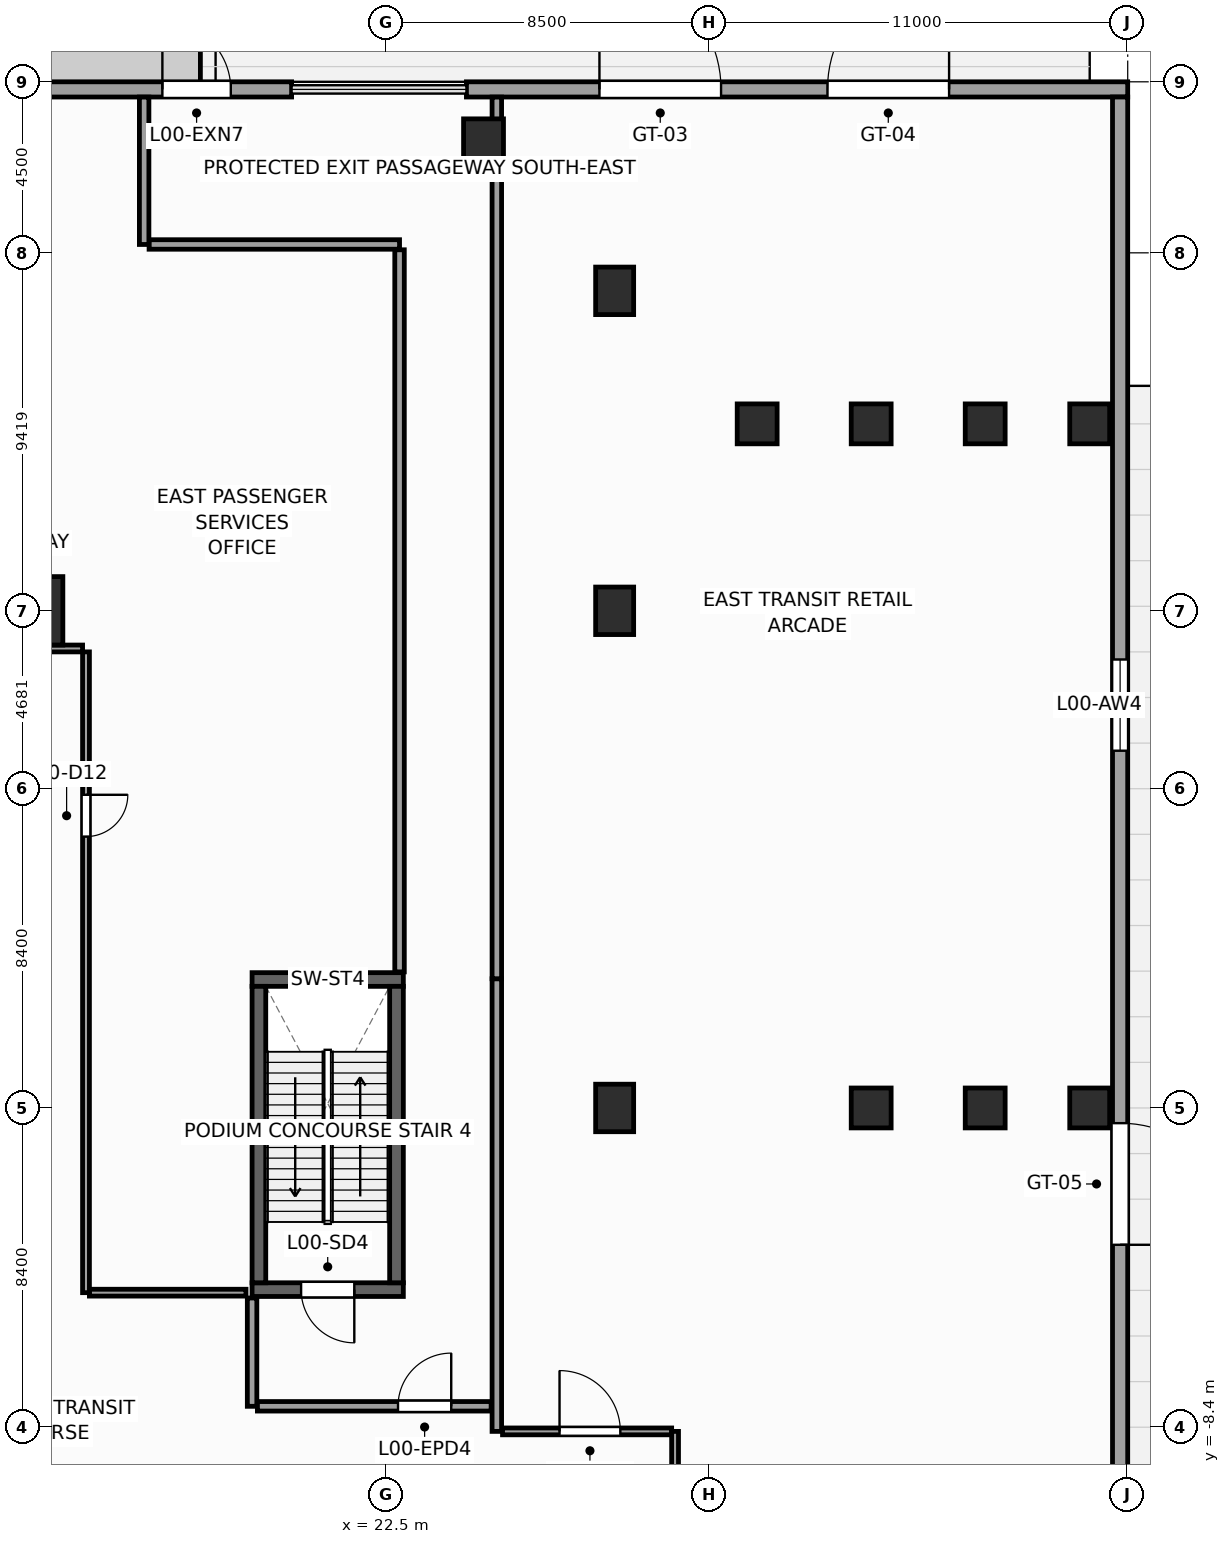
"""IFC4 building model, lengths in metres.
Left out: names, types, materials, properties, quantities, classifications, styles, units other than length and angle.
Written with IfcOpenShell. Run it as: python <this file> out.ifc"""

import sys

from ifc_helpers import new_model, si_unit, direction, frame, frame_2d, origin, origin_2d, place, context, subcontext, project, spatial, rectangle, extrude, source, transform, mapped, element, fill, save


model = new_model("IFC4")
c1 = context("Model", 3, precision=1e-05, world=origin(), true_north=direction((0.0, 1.0)))
c2 = subcontext(c1, "Body", "Model", "MODEL_VIEW")
j1 = project(units=[si_unit("LENGTHUNIT", "METRE"), si_unit("PLANEANGLEUNIT", "RADIAN")], contexts=[c1])
p1 = place(None, origin())
s1 = spatial("IfcSite", under=j1, at=p1, CompositionType="ELEMENT")
p2 = place(p1, origin())
s2 = spatial("IfcBuilding", under=s1, at=p2, CompositionType="ELEMENT")
p3 = place(p2, origin())
s3 = spatial("IfcBuildingStorey", under=s2, at=p3, CompositionType="ELEMENT", Elevation=0.0)
p4 = place(p3, frame((18.96, -4.78, 0.0), z_axis=(0.0, 0.0, 1.0), x_axis=(1.0, 0.0, 0.0)))
e1 = element("IfcWall", 1, at=p4, inside=s3, PredefinedType="SHEAR", context=c2, shape_type="SweptSolid", body=[
    extrude(rectangle(XDim=3.98, YDim=0.36, at=frame_2d((1.99, 0.0))), origin(), (0.0, 0.0, 1.0), 6.0),
])
p5 = place(p4, frame((1.29, 0.0, 0.0)))
e2 = element("IfcOpeningElement", 2, at=p5, cuts=e1, PredefinedType="OPENING", context=c2, shape_type="SweptSolid", body=[
    extrude(rectangle(XDim=1.4, YDim=2.2, at=frame_2d((0.7, 1.1))), frame((0.0, 0.19, 0.0), z_axis=(0.0, -1.0, 0.0), x_axis=(1.0, 0.0, 0.0)), (0.0, 0.0, 1.0), 0.38),
])
p6 = place(p3, frame((18.96, 3.38, 0.0), z_axis=(0.0, 0.0, 1.0), x_axis=(1.0, 0.0, 0.0)))
e3 = element("IfcWall", 3, at=p6, inside=s3, PredefinedType="SHEAR", context=c2, shape_type="SweptSolid", body=[
    extrude(rectangle(XDim=3.98, YDim=0.36, at=frame_2d((1.99, 0.0))), origin(), (0.0, 0.0, 1.0), 6.0),
])
for number, where, z_axis, x_axis in (
    (4, (19.14, -4.6, 0.0), (0.0, 0.0, 1.0), (0.0, 1.0, 0.0)),
    (5, (22.76, -4.6, 0.0), (0.0, 0.0, 1.0), (0.0, 1.0, 0.0)),
):
    element("IfcWall", number, at=place(p3, frame(where, z_axis=z_axis, x_axis=x_axis)), inside=s3, PredefinedType="SHEAR", context=c2, shape_type="SweptSolid", body=[
        extrude(rectangle(XDim=7.8, YDim=0.36, at=frame_2d((3.9, 0.0))), origin(), (0.0, 0.0, 1.0), 6.0),
    ])
m1 = source(origin(), c2, "Body", "SweptSolid", [
    extrude(rectangle(XDim=1.8, YDim=1.8, at=origin_2d()), origin(), (0.0, 0.0, 1.0), 6.0),
])
p7 = place(p3, frame((13.081, 13.081, 0.0), z_axis=(0.0, 0.0, 1.0), x_axis=(1.0, 0.0, 0.0)))
e6 = element("IfcColumn", 6, at=p7, inside=s3, PredefinedType="COLUMN", context=c2, shape_type="MappedRepresentation", body=[
    mapped(m1, transform((0.0, 0.0, 0.0), scale=1.0)),
])
m2 = source(origin(), c2, "Body", "SweptSolid", [
    extrude(rectangle(XDim=1.0, YDim=1.25, at=origin_2d()), origin(), (0.0, 0.0, 1.0), 6.0),
])
for number, where, z_axis, x_axis in (
    (7, (28.5, 21.5, 0.0), (0.0, 0.0, 1.0), (1.0, 0.0, 0.0)),
    (8, (28.5, 0.0, 0.0), (0.0, 0.0, 1.0), (1.0, 0.0, 0.0)),
    (9, (28.5, 13.081, 0.0), (0.0, 0.0, 1.0), (1.0, 0.0, 0.0)),
):
    element("IfcColumn", number, at=place(p3, frame(where, z_axis=z_axis, x_axis=x_axis)), inside=s3, PredefinedType="COLUMN", context=c2, shape_type="MappedRepresentation", body=[
        mapped(m2, transform((0.0, 0.0, 0.0), scale=1.0)),
    ])
m3 = source(origin(), c2, "Body", "SweptSolid", [
    extrude(rectangle(XDim=1.05, YDim=1.05, at=origin_2d()), origin(), (0.0, 0.0, 1.0), 6.0),
])
for number, where, z_axis, x_axis in (
    (10, (25.05, 25.5, 0.0), (0.0, 0.0, 1.0), (1.0, 0.0, 0.0)),
    (11, (32.25, 18.0, 0.0), (0.0, 0.0, 1.0), (1.0, 0.0, 0.0)),
    (12, (35.25, 0.0, 0.0), (0.0, 0.0, 1.0), (1.0, 0.0, 0.0)),
    (13, (35.25, 18.0, 0.0), (0.0, 0.0, 1.0), (1.0, 0.0, 0.0)),
    (14, (38.25, 0.0, 0.0), (0.0, 0.0, 1.0), (1.0, 0.0, 0.0)),
    (15, (38.25, 18.0, 0.0), (0.0, 0.0, 1.0), (1.0, 0.0, 0.0)),
    (16, (41.0, 0.0, 0.0), (0.0, 0.0, 1.0), (1.0, 0.0, 0.0)),
    (17, (41.0, 18.0, 0.0), (0.0, 0.0, 1.0), (1.0, 0.0, 0.0)),
):
    element("IfcColumn", number, at=place(p3, frame(where, z_axis=z_axis, x_axis=x_axis)), inside=s3, PredefinedType="COLUMN", context=c2, shape_type="MappedRepresentation", body=[
        mapped(m3, transform((0.0, 0.0, 0.0), scale=1.0)),
    ])
p8 = place(p3, frame((-30.0, 26.8, 0.0), z_axis=(0.0, 0.0, 1.0), x_axis=(1.0, 0.0, 0.0)))
e18 = element("IfcWall", 18, at=p8, inside=s3, PredefinedType="STANDARD", context=c2, shape_type="SweptSolid", body=[
    extrude(rectangle(XDim=50.0, YDim=0.4, at=frame_2d((25.0, 0.0))), origin(), (0.0, 0.0, 1.0), 5.66),
])
p9 = place(p8, frame((9.6, 0.0, 0.0)))
e19 = element("IfcOpeningElement", 19, at=p9, cuts=e18, PredefinedType="OPENING", context=c2, shape_type="SweptSolid", body=[
    extrude(rectangle(XDim=1.8, YDim=2.4, at=frame_2d((0.9, 1.2))), frame((0.0, 0.21, 0.0), z_axis=(0.0, -1.0, 0.0), x_axis=(1.0, 0.0, 0.0)), (0.0, 0.0, 1.0), 0.42),
])
p10 = place(p8, frame((14.3, 0.0, 0.0)))
e20 = element("IfcOpeningElement", 20, at=p10, cuts=e18, PredefinedType="OPENING", context=c2, shape_type="SweptSolid", body=[
    extrude(rectangle(XDim=1.8, YDim=2.4, at=frame_2d((0.9, 1.2))), frame((0.0, 0.21, 0.0), z_axis=(0.0, -1.0, 0.0), x_axis=(1.0, 0.0, 0.0)), (0.0, 0.0, 1.0), 0.42),
])
p11 = place(p8, frame((18.925, 0.0, 0.0)))
e21 = element("IfcOpeningElement", 21, at=p11, cuts=e18, PredefinedType="OPENING", context=c2, shape_type="SweptSolid", body=[
    extrude(rectangle(XDim=1.8, YDim=2.4, at=frame_2d((0.9, 1.2))), frame((0.0, 0.21, 0.0), z_axis=(0.0, -1.0, 0.0), x_axis=(1.0, 0.0, 0.0)), (0.0, 0.0, 1.0), 0.42),
])
p12 = place(p8, frame((23.9, 0.0, 0.0)))
e22 = element("IfcOpeningElement", 22, at=p12, cuts=e18, PredefinedType="OPENING", context=c2, shape_type="SweptSolid", body=[
    extrude(rectangle(XDim=1.8, YDim=2.4, at=frame_2d((0.9, 1.2))), frame((0.0, 0.21, 0.0), z_axis=(0.0, -1.0, 0.0), x_axis=(1.0, 0.0, 0.0)), (0.0, 0.0, 1.0), 0.42),
])
p13 = place(p8, frame((34.3, 0.0, 0.0)))
e23 = element("IfcOpeningElement", 23, at=p13, cuts=e18, PredefinedType="OPENING", context=c2, shape_type="SweptSolid", body=[
    extrude(rectangle(XDim=1.8, YDim=2.4, at=frame_2d((0.9, 1.2))), frame((0.0, 0.21, 0.0), z_axis=(0.0, -1.0, 0.0), x_axis=(1.0, 0.0, 0.0)), (0.0, 0.0, 1.0), 0.42),
])
p14 = place(p8, frame((39.275, 0.0, 0.0)))
e24 = element("IfcOpeningElement", 24, at=p14, cuts=e18, PredefinedType="OPENING", context=c2, shape_type="SweptSolid", body=[
    extrude(rectangle(XDim=1.8, YDim=2.4, at=frame_2d((0.9, 1.2))), frame((0.0, 0.21, 0.0), z_axis=(0.0, -1.0, 0.0), x_axis=(1.0, 0.0, 0.0)), (0.0, 0.0, 1.0), 0.42),
])
p15 = place(p8, frame((46.6, 0.0, 0.0)))
e25 = element("IfcOpeningElement", 25, at=p15, cuts=e18, PredefinedType="OPENING", context=c2, shape_type="SweptSolid", body=[
    extrude(rectangle(XDim=1.8, YDim=2.4, at=frame_2d((0.9, 1.2))), frame((0.0, 0.21, 0.0), z_axis=(0.0, -1.0, 0.0), x_axis=(1.0, 0.0, 0.0)), (0.0, 0.0, 1.0), 0.42),
])
p16 = place(p3, frame((24.6, 26.8, 0.0), z_axis=(0.0, 0.0, 1.0), x_axis=(1.0, 0.0, 0.0)))
e26 = element("IfcWall", 26, at=p16, inside=s3, PredefinedType="STANDARD", context=c2, shape_type="SweptSolid", body=[
    extrude(rectangle(XDim=17.4, YDim=0.4, at=frame_2d((8.7, 0.0))), origin(), (0.0, 0.0, 1.0), 5.66),
])
p17 = place(p16, frame((3.5, 0.0, 0.0)))
e27 = element("IfcOpeningElement", 27, at=p17, cuts=e26, PredefinedType="OPENING", context=c2, shape_type="SweptSolid", body=[
    extrude(rectangle(XDim=3.2, YDim=3.6, at=frame_2d((1.6, 1.8))), frame((0.0, 0.21, 0.0), z_axis=(0.0, -1.0, 0.0), x_axis=(1.0, 0.0, 0.0)), (0.0, 0.0, 1.0), 0.42),
])
p18 = place(p16, frame((9.5, 0.0, 0.0)))
e28 = element("IfcOpeningElement", 28, at=p18, cuts=e26, PredefinedType="OPENING", context=c2, shape_type="SweptSolid", body=[
    extrude(rectangle(XDim=3.2, YDim=3.6, at=frame_2d((1.6, 1.8))), frame((0.0, 0.21, 0.0), z_axis=(0.0, -1.0, 0.0), x_axis=(1.0, 0.0, 0.0)), (0.0, 0.0, 1.0), 0.42),
])
p19 = place(p3, frame((41.8, -26.6, 0.0), z_axis=(0.0, 0.0, 1.0), x_axis=(0.0, 1.0, 0.0)))
e29 = element("IfcWall", 29, at=p19, inside=s3, PredefinedType="STANDARD", context=c2, shape_type="SweptSolid", body=[
    extrude(rectangle(XDim=53.2, YDim=0.4, at=frame_2d((26.6, 0.0))), origin(), (0.0, 0.0, 1.0), 5.66),
])
p20 = place(p19, frame((10.0, 0.0, 0.9)))
e30 = element("IfcOpeningElement", 30, at=p20, cuts=e29, PredefinedType="OPENING", context=c2, shape_type="SweptSolid", body=[
    extrude(rectangle(XDim=2.4, YDim=3.2, at=frame_2d((1.2, 1.6))), frame((0.0, 0.21, 0.0), z_axis=(0.0, -1.0, 0.0), x_axis=(1.0, 0.0, 0.0)), (0.0, 0.0, 1.0), 0.42),
])
p21 = place(p19, frame((36.0, 0.0, 0.9)))
e31 = element("IfcOpeningElement", 31, at=p21, cuts=e29, PredefinedType="OPENING", context=c2, shape_type="SweptSolid", body=[
    extrude(rectangle(XDim=2.4, YDim=3.2, at=frame_2d((1.2, 1.6))), frame((0.0, 0.21, 0.0), z_axis=(0.0, -1.0, 0.0), x_axis=(1.0, 0.0, 0.0)), (0.0, 0.0, 1.0), 0.42),
])
p22 = place(p19, frame((23.0, 0.0, 0.0)))
e32 = element("IfcOpeningElement", 32, at=p22, cuts=e29, PredefinedType="OPENING", context=c2, shape_type="SweptSolid", body=[
    extrude(rectangle(XDim=3.2, YDim=3.6, at=frame_2d((1.6, 1.8))), frame((0.0, 0.21, 0.0), z_axis=(0.0, -1.0, 0.0), x_axis=(1.0, 0.0, 0.0)), (0.0, 0.0, 1.0), 0.42),
])
p23 = place(p3, frame((25.55, -8.51, 0.0), z_axis=(0.0, 0.0, 1.0), x_axis=(1.0, 0.0, 0.0)))
e33 = element("IfcWall", 33, at=p23, inside=s3, PredefinedType="PARTITIONING", context=c2, shape_type="SweptSolid", body=[
    extrude(rectangle(XDim=4.45, YDim=0.18, at=frame_2d((2.225, 0.0))), origin(), (0.0, 0.0, 1.0), 5.66),
])
p24 = place(p23, frame((1.5, 0.0, 0.0)))
e34 = element("IfcOpeningElement", 34, at=p24, cuts=e33, PredefinedType="OPENING", context=c2, shape_type="SweptSolid", body=[
    extrude(rectangle(XDim=1.6, YDim=2.5, at=frame_2d((0.8, 1.25))), frame((0.0, 0.1, 0.0), z_axis=(0.0, -1.0, 0.0), x_axis=(1.0, 0.0, 0.0)), (0.0, 0.0, 1.0), 0.2),
])
p25 = place(p3, frame((30.09, -11.89, 0.0), z_axis=(0.0, 0.0, 1.0), x_axis=(0.0, 1.0, 0.0)))
e35 = element("IfcWall", 35, at=p25, inside=s3, PredefinedType="PARTITIONING", context=c2, shape_type="SweptSolid", body=[
    extrude(rectangle(XDim=3.38, YDim=0.18, at=frame_2d((1.69, 0.0))), origin(), (0.0, 0.0, 1.0), 5.66),
])
p26 = place(p3, frame((14.68, -4.86, 0.0), z_axis=(0.0, 0.0, 1.0), x_axis=(1.0, 0.0, 0.0)))
e36 = element("IfcWall", 36, at=p26, inside=s3, PredefinedType="PARTITIONING", context=c2, shape_type="SweptSolid", body=[
    extrude(rectangle(XDim=4.12, YDim=0.18, at=frame_2d((2.06, 0.0))), origin(), (0.0, 0.0, 1.0), 5.66),
])
p27 = place(p3, frame((14.59, -4.86, 0.0), z_axis=(0.0, 0.0, 1.0), x_axis=(0.0, 1.0, 0.0)))
e37 = element("IfcWall", 37, at=p27, inside=s3, PredefinedType="PARTITIONING", context=c2, shape_type="SweptSolid", body=[
    extrude(rectangle(XDim=16.86, YDim=0.18, at=frame_2d((8.43, 0.0))), origin(), (0.0, 0.0, 1.0), 5.66),
])
p28 = place(p27, frame((12.0, 0.0, 0.0)))
e38 = element("IfcOpeningElement", 38, at=p28, cuts=e37, PredefinedType="OPENING", context=c2, shape_type="SweptSolid", body=[
    extrude(rectangle(XDim=1.1, YDim=2.2, at=frame_2d((0.55, 1.1))), frame((0.0, 0.1, 0.0), z_axis=(0.0, -1.0, 0.0), x_axis=(1.0, 0.0, 0.0)), (0.0, 0.0, 1.0), 0.2),
])
p29 = place(p3, frame((-14.5, 12.09, 0.0), z_axis=(0.0, 0.0, 1.0), x_axis=(1.0, 0.0, 0.0)))
e39 = element("IfcWall", 39, at=p29, inside=s3, PredefinedType="PARTITIONING", context=c2, shape_type="SweptSolid", body=[
    extrude(rectangle(XDim=29.0, YDim=0.18, at=frame_2d((14.5, 0.0))), origin(), (0.0, 0.0, 1.0), 5.66),
])
p30 = place(p29, frame((13.7, 0.0, 0.0)))
e40 = element("IfcOpeningElement", 40, at=p30, cuts=e39, PredefinedType="OPENING", context=c2, shape_type="SweptSolid", body=[
    extrude(rectangle(XDim=1.6, YDim=2.5, at=frame_2d((0.8, 1.25))), frame((0.0, 0.1, 0.0), z_axis=(0.0, -1.0, 0.0), x_axis=(1.0, 0.0, 0.0)), (0.0, 0.0, 1.0), 0.2),
])
p31 = place(p3, frame((25.4, -8.51, 0.0), z_axis=(0.0, 0.0, 1.0), x_axis=(0.0, 1.0, 0.0)))
e41 = element("IfcWall", 41, at=p31, inside=s3, PredefinedType="PARTITIONING", context=c2, shape_type="SweptSolid", body=[
    extrude(rectangle(XDim=11.91, YDim=0.25, at=frame_2d((5.955, 0.0))), origin(), (0.0, 0.0, 1.0), 5.66),
])
p32 = place(p3, frame((25.4, 3.4, 0.0), z_axis=(0.0, 0.0, 1.0), x_axis=(0.0, 1.0, 0.0)))
e42 = element("IfcWall", 42, at=p32, inside=s3, PredefinedType="PARTITIONING", context=c2, shape_type="SweptSolid", body=[
    extrude(rectangle(XDim=23.198, YDim=0.25, at=frame_2d((11.599, 0.0))), origin(), (0.0, 0.0, 1.0), 5.66),
])
p33 = place(p3, frame((19.1, -7.85, 0.0), z_axis=(0.0, 0.0, 1.0), x_axis=(1.0, 0.0, 0.0)))
e43 = element("IfcWall", 43, at=p33, inside=s3, PredefinedType="PARTITIONING", context=c2, shape_type="SweptSolid", body=[
    extrude(rectangle(XDim=6.15, YDim=0.25, at=frame_2d((3.075, 0.0))), origin(), (0.0, 0.0, 1.0), 5.66),
])
p34 = place(p33, frame((3.7, 0.0, 0.0)))
e44 = element("IfcOpeningElement", 44, at=p34, cuts=e43, PredefinedType="OPENING", context=c2, shape_type="SweptSolid", body=[
    extrude(rectangle(XDim=1.4, YDim=2.2, at=frame_2d((0.7, 1.1))), frame((0.0, 0.135, 0.0), z_axis=(0.0, -1.0, 0.0), x_axis=(1.0, 0.0, 0.0)), (0.0, 0.0, 1.0), 0.27),
])
p35 = place(p3, frame((18.96, -7.85, 0.0), z_axis=(0.0, 0.0, 1.0), x_axis=(0.0, 1.0, 0.0)))
e45 = element("IfcWall", 45, at=p35, inside=s3, PredefinedType="PARTITIONING", context=c2, shape_type="SweptSolid", body=[
    extrude(rectangle(XDim=2.85, YDim=0.25, at=frame_2d((1.425, 0.0))), origin(), (0.0, 0.0, 1.0), 5.66),
])
p36 = place(p3, frame((22.84, 3.58, 0.0), z_axis=(0.0, 0.0, 1.0), x_axis=(0.0, 1.0, 0.0)))
e46 = element("IfcWall", 46, at=p36, inside=s3, PredefinedType="PARTITIONING", context=c2, shape_type="SweptSolid", body=[
    extrude(rectangle(XDim=19.0, YDim=0.25, at=frame_2d((9.5, 0.0))), origin(), (0.0, 0.0, 1.0), 5.66),
])
p37 = place(p3, frame((16.25, 22.72, 0.0), z_axis=(0.0, 0.0, 1.0), x_axis=(1.0, 0.0, 0.0)))
e47 = element("IfcWall", 47, at=p37, inside=s3, PredefinedType="PARTITIONING", context=c2, shape_type="SweptSolid", body=[
    extrude(rectangle(XDim=6.59, YDim=0.25, at=frame_2d((3.295, 0.0))), origin(), (0.0, 0.0, 1.0), 5.66),
])
p38 = place(p3, frame((16.12, 22.72, 0.0), z_axis=(0.0, 0.0, 1.0), x_axis=(0.0, 1.0, 0.0)))
e48 = element("IfcWall", 48, at=p38, inside=s3, PredefinedType="PARTITIONING", context=c2, shape_type="SweptSolid", body=[
    extrude(rectangle(XDim=3.878, YDim=0.25, at=frame_2d((1.939, 0.0))), origin(), (0.0, 0.0, 1.0), 5.66),
])
m4 = source(origin(), c2, "Body", "SweptSolid", [
    extrude(rectangle(XDim=2.4, YDim=3.2, at=frame_2d((1.2, 1.6))), frame((0.0, 0.03, 0.0), z_axis=(0.0, -1.0, 0.0), x_axis=(1.0, 0.0, 0.0)), (0.0, 0.0, 1.0), 0.06),
])
p39 = place(p21, origin())
e49 = element("IfcWindow", 49, at=p39, inside=s3, PartitioningType="SINGLE_PANEL", PredefinedType="WINDOW", context=c2, shape_type="MappedRepresentation", body=[
    mapped(m4, transform((0.0, 0.0, 0.0), scale=1.0)),
])
fill(e31, e49)
m5 = source(origin(), c2, "Body", "SweptSolid", [
    extrude(rectangle(XDim=1.8, YDim=2.4, at=frame_2d((0.9, 1.2))), frame((0.0, 0.025, 0.0), z_axis=(0.0, -1.0, 0.0), x_axis=(1.0, 0.0, 0.0)), (0.0, 0.0, 1.0), 0.05),
])
p40 = place(p15, origin())
e50 = element("IfcDoor", 50, at=p40, inside=s3, OperationType="SINGLE_SWING_LEFT", PredefinedType="DOOR", context=c2, shape_type="MappedRepresentation", body=[
    mapped(m5, transform((0.0, 0.0, 0.0), scale=1.0)),
])
fill(e25, e50)
m6 = source(origin(), c2, "Body", "SweptSolid", [
    extrude(rectangle(XDim=3.2, YDim=3.6, at=frame_2d((1.6, 1.8))), frame((0.0, 0.025, 0.0), z_axis=(0.0, -1.0, 0.0), x_axis=(1.0, 0.0, 0.0)), (0.0, 0.0, 1.0), 0.05),
])
p41 = place(p17, origin())
e51 = element("IfcDoor", 51, at=p41, inside=s3, OperationType="SINGLE_SWING_LEFT", PredefinedType="GATE", context=c2, shape_type="MappedRepresentation", body=[
    mapped(m6, transform((0.0, 0.0, 0.0), scale=1.0)),
])
fill(e27, e51)
p42 = place(p18, origin())
e52 = element("IfcDoor", 52, at=p42, inside=s3, OperationType="SINGLE_SWING_RIGHT", PredefinedType="GATE", context=c2, shape_type="MappedRepresentation", body=[
    mapped(m6, transform((0.0, 0.0, 0.0), scale=1.0)),
])
fill(e28, e52)
p43 = place(p22, frame((3.2, 0.0, 0.0), z_axis=(0.0, 0.0, 1.0), x_axis=(-1.0, 0.0, 0.0)))
e53 = element("IfcDoor", 53, at=p43, inside=s3, OperationType="SINGLE_SWING_LEFT", PredefinedType="GATE", context=c2, shape_type="MappedRepresentation", body=[
    mapped(m6, transform((0.0, 0.0, 0.0), scale=1.0)),
])
fill(e32, e53)
m7 = source(origin(), c2, "Body", "SweptSolid", [
    extrude(rectangle(XDim=1.4, YDim=2.2, at=frame_2d((0.7, 1.1))), frame((0.0, 0.025, 0.0), z_axis=(0.0, -1.0, 0.0), x_axis=(1.0, 0.0, 0.0)), (0.0, 0.0, 1.0), 0.05),
])
p44 = place(p5, frame((1.4, 0.0, 0.0), z_axis=(0.0, 0.0, 1.0), x_axis=(-1.0, 0.0, 0.0)))
e54 = element("IfcDoor", 54, at=p44, inside=s3, OperationType="SINGLE_SWING_RIGHT", PredefinedType="DOOR", context=c2, shape_type="MappedRepresentation", body=[
    mapped(m7, transform((0.0, 0.0, 0.0), scale=1.0)),
])
fill(e2, e54)
p45 = place(p34, origin())
e55 = element("IfcDoor", 55, at=p45, inside=s3, OperationType="SINGLE_SWING_RIGHT", PredefinedType="DOOR", context=c2, shape_type="MappedRepresentation", body=[
    mapped(m7, transform((0.0, 0.0, 0.0), scale=1.0)),
])
fill(e44, e55)
m8 = source(origin(), c2, "Body", "SweptSolid", [
    extrude(rectangle(XDim=1.6, YDim=2.5, at=frame_2d((0.8, 1.25))), frame((0.0, 0.025, 0.0), z_axis=(0.0, -1.0, 0.0), x_axis=(1.0, 0.0, 0.0)), (0.0, 0.0, 1.0), 0.05),
])
p46 = place(p24, origin())
e56 = element("IfcDoor", 56, at=p46, inside=s3, OperationType="SINGLE_SWING_LEFT", PredefinedType="DOOR", context=c2, shape_type="MappedRepresentation", body=[
    mapped(m8, transform((0.0, 0.0, 0.0), scale=1.0)),
])
fill(e34, e56)
m9 = source(origin(), c2, "Body", "SweptSolid", [
    extrude(rectangle(XDim=1.1, YDim=2.2, at=frame_2d((0.55, 1.1))), frame((0.0, 0.025, 0.0), z_axis=(0.0, -1.0, 0.0), x_axis=(1.0, 0.0, 0.0)), (0.0, 0.0, 1.0), 0.05),
])
p47 = place(p28, frame((1.1, 0.0, 0.0), z_axis=(0.0, 0.0, 1.0), x_axis=(-1.0, 0.0, 0.0)))
e57 = element("IfcDoor", 57, at=p47, inside=s3, OperationType="SINGLE_SWING_RIGHT", PredefinedType="DOOR", context=c2, shape_type="MappedRepresentation", body=[
    mapped(m9, transform((0.0, 0.0, 0.0), scale=1.0)),
])
fill(e38, e57)
save(model, sys.argv[1])
